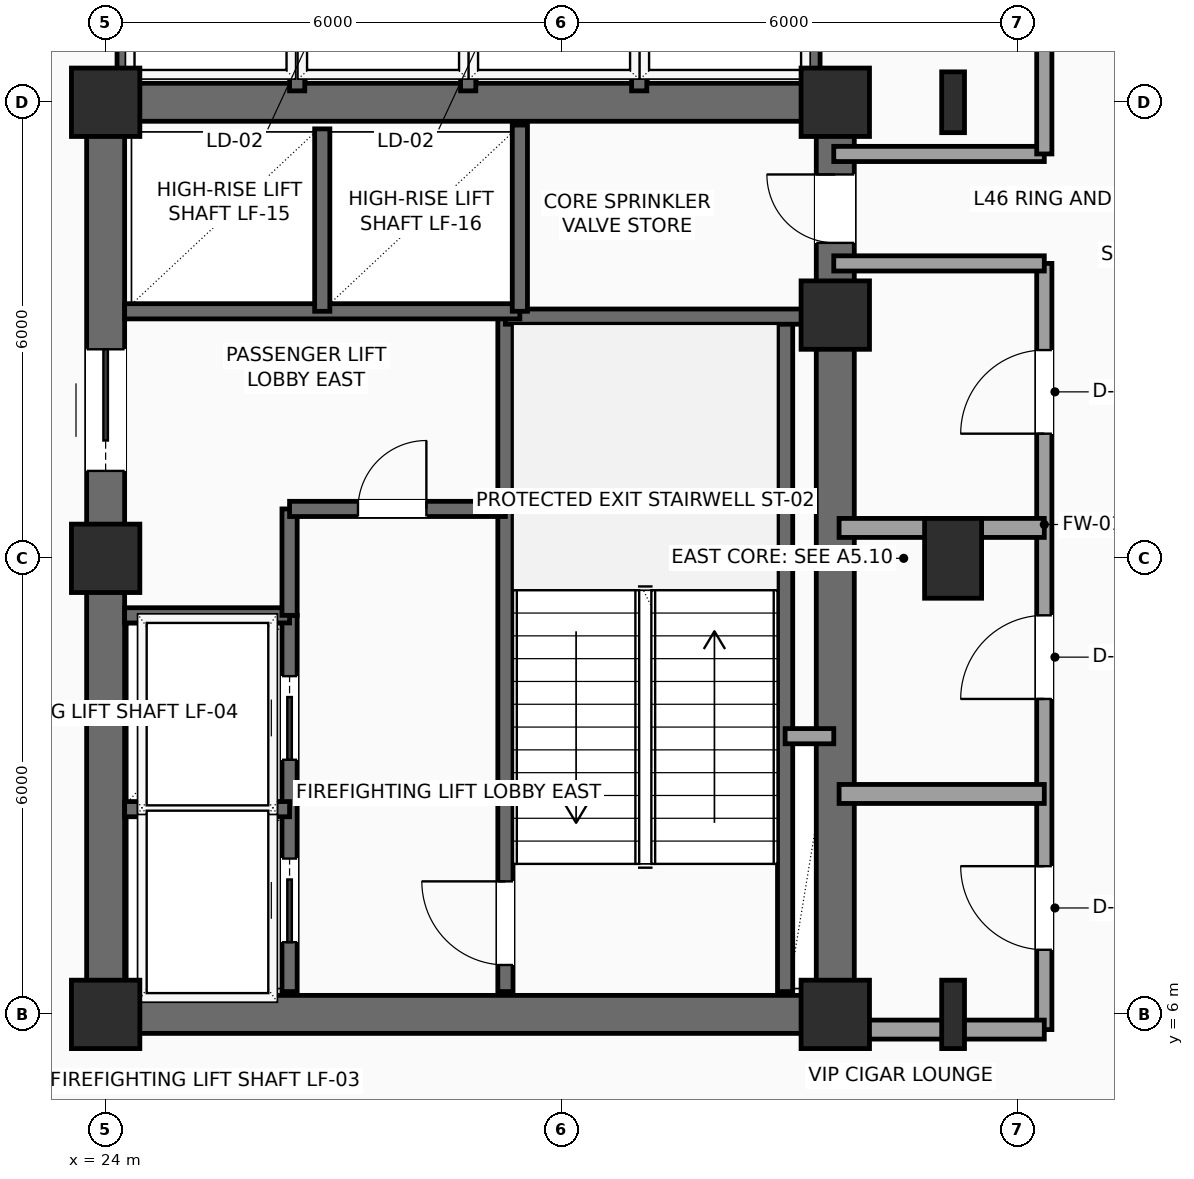
"""IFC4 building model, lengths in metres.
Left out: names, types, materials, properties, quantities, classifications, styles, units other than length and angle.
Written with IfcOpenShell. Run it as: python <this file> out.ifc"""

import sys

from ifc_helpers import new_model, si_unit, direction, frame, frame_2d, origin, origin_2d, place, context, subcontext, project, spatial, rectangle, i_section, extrude, element, fill, save


model = new_model("IFC4")
c1 = context("Model", 3, precision=1e-05, world=origin(), true_north=direction((0.0, 1.0)))
c2 = subcontext(c1, "Body", "Model", "MODEL_VIEW")
j1 = project(units=[si_unit("LENGTHUNIT", "METRE"), si_unit("PLANEANGLEUNIT", "RADIAN")], contexts=[c1])
p1 = place(None, origin())
s1 = spatial("IfcSite", under=j1, at=p1, CompositionType="ELEMENT")
p2 = place(p1, origin())
s2 = spatial("IfcBuilding", under=s1, at=p2, CompositionType="ELEMENT")
p3 = place(p2, frame((0.0, 0.0, 187.95)))
s3 = spatial("IfcBuildingStorey", under=s2, at=p3, CompositionType="ELEMENT", Elevation=187.95)
for number, where, z_axis, x_axis in (
    (1, (24.0, 6.0, 0.0), (0.0, 0.0, 1.0), (1.0, 0.0, 0.0)),
    (2, (24.0, 12.0, 0.0), (0.0, 0.0, 1.0), (1.0, 0.0, 0.0)),
    (3, (24.0, 18.0, 0.0), (0.0, 0.0, 1.0), (1.0, 0.0, 0.0)),
    (4, (33.6, 6.0, 0.0), (0.0, 0.0, 1.0), (1.0, 0.0, 0.0)),
    (5, (33.6, 15.2, 0.0), (0.0, 0.0, 1.0), (1.0, 0.0, 0.0)),
    (6, (33.6, 18.0, 0.0), (0.0, 0.0, 1.0), (1.0, 0.0, 0.0)),
):
    element("IfcColumn", number, at=place(p3, frame(where, z_axis=z_axis, x_axis=x_axis)), inside=s3, PredefinedType="COLUMN", context=c2, shape_type="SweptSolid", body=[
        extrude(rectangle(XDim=0.9, YDim=0.9, at=origin_2d()), origin(), (0.0, 0.0, 1.0), 3.75),
    ])
p4 = place(p3, frame((35.15, 6.0, 0.0), z_axis=(0.0, 0.0, 1.0), x_axis=(1.0, 0.0, 0.0)))
e7 = element("IfcColumn", 7, at=p4, inside=s3, PredefinedType="COLUMN", context=c2, shape_type="SweptSolid", body=[
    extrude(i_section(OverallWidth=0.3, OverallDepth=0.9, WebThickness=0.019, FlangeThickness=0.035, FilletRadius=0.03, at=origin_2d()), origin(), (0.0, 0.0, 1.0), 3.75),
])
p5 = place(p3, frame((35.15, 12.0, 0.0), z_axis=(0.0, 0.0, 1.0), x_axis=(1.0, 0.0, 0.0)))
e8 = element("IfcColumn", 8, at=p5, inside=s3, PredefinedType="COLUMN", context=c2, shape_type="SweptSolid", body=[
    extrude(rectangle(XDim=0.75, YDim=1.05, at=origin_2d()), origin(), (0.0, 0.0, 1.0), 3.75),
])
p6 = place(p3, frame((35.15, 18.0, 0.0), z_axis=(0.0, 0.0, 1.0), x_axis=(1.0, 0.0, 0.0)))
e9 = element("IfcColumn", 9, at=p6, inside=s3, PredefinedType="COLUMN", context=c2, shape_type="SweptSolid", body=[
    extrude(i_section(OverallWidth=0.3, OverallDepth=0.8, WebThickness=0.018, FlangeThickness=0.033, FilletRadius=0.03, at=origin_2d()), origin(), (0.0, 0.0, 1.0), 3.75),
])
for number, where, z_axis, x_axis in (
    (10, (24.0, 6.0, 0.0), (0.0, 0.0, 1.0), (1.0, 0.0, 0.0)),
    (11, (24.0, 18.0, 0.0), (0.0, 0.0, 1.0), (1.0, 0.0, 0.0)),
):
    element("IfcWall", number, at=place(p3, frame(where, z_axis=z_axis, x_axis=x_axis)), inside=s3, PredefinedType="SHEAR", context=c2, shape_type="SweptSolid", body=[
        extrude(rectangle(XDim=9.6, YDim=0.5, at=frame_2d((4.8, 0.0))), origin(), (0.0, 0.0, 1.0), 3.54),
    ])
p7 = place(p3, frame((24.0, 6.0, 0.0), z_axis=(0.0, 0.0, 1.0), x_axis=(0.0, 1.0, 0.0)))
e12 = element("IfcWall", 12, at=p7, inside=s3, PredefinedType="SHEAR", context=c2, shape_type="SweptSolid", body=[
    extrude(rectangle(XDim=12.0, YDim=0.5, at=frame_2d((6.0, 0.0))), origin(), (0.0, 0.0, 1.0), 3.54),
])
p8 = place(p7, frame((7.15, 0.0, 0.0)))
e13 = element("IfcOpeningElement", 13, at=p8, cuts=e12, PredefinedType="OPENING", context=c2, shape_type="SweptSolid", body=[
    extrude(rectangle(XDim=1.6, YDim=2.3, at=frame_2d((0.8, 1.15))), frame((0.0, 0.26, 0.0), z_axis=(0.0, -1.0, 0.0), x_axis=(1.0, 0.0, 0.0)), (0.0, 0.0, 1.0), 0.52),
])
p9 = place(p3, frame((33.6, 6.0, 0.0), z_axis=(0.0, 0.0, 1.0), x_axis=(0.0, 1.0, 0.0)))
e14 = element("IfcWall", 14, at=p9, inside=s3, PredefinedType="SHEAR", context=c2, shape_type="SweptSolid", body=[
    extrude(rectangle(XDim=12.0, YDim=0.5, at=frame_2d((6.0, 0.0))), origin(), (0.0, 0.0, 1.0), 3.54),
])
p10 = place(p9, frame((10.15, 0.0, 0.0)))
e15 = element("IfcOpeningElement", 15, at=p10, cuts=e14, PredefinedType="OPENING", context=c2, shape_type="SweptSolid", body=[
    extrude(rectangle(XDim=0.9, YDim=2.15, at=frame_2d((0.45, 1.075))), frame((0.0, 0.26, 0.0), z_axis=(0.0, -1.0, 0.0), x_axis=(1.0, 0.0, 0.0)), (0.0, 0.0, 1.0), 0.52),
])
p11 = place(p3, frame((29.26, 6.3, 0.0), z_axis=(0.0, 0.0, 1.0), x_axis=(0.0, 1.0, 0.0)))
e16 = element("IfcWall", 16, at=p11, inside=s3, PredefinedType="SHEAR", context=c2, shape_type="SweptSolid", body=[
    extrude(rectangle(XDim=8.88, YDim=0.2, at=frame_2d((4.44, 0.0))), origin(), (0.0, 0.0, 1.0), 3.54),
])
p12 = place(p11, frame((0.35, 0.0, 0.0)))
e17 = element("IfcOpeningElement", 17, at=p12, cuts=e16, PredefinedType="OPENING", context=c2, shape_type="SweptSolid", body=[
    extrude(rectangle(XDim=1.1, YDim=2.2, at=frame_2d((0.55, 1.1))), frame((0.0, 0.11, 0.0), z_axis=(0.0, -1.0, 0.0), x_axis=(1.0, 0.0, 0.0)), (0.0, 0.0, 1.0), 0.22),
])
p13 = place(p3, frame((32.94, 6.3, 0.0), z_axis=(0.0, 0.0, 1.0), x_axis=(0.0, 1.0, 0.0)))
e18 = element("IfcWall", 18, at=p13, inside=s3, PredefinedType="SHEAR", context=c2, shape_type="SweptSolid", body=[
    extrude(rectangle(XDim=8.88, YDim=0.2, at=frame_2d((4.44, 0.0))), origin(), (0.0, 0.0, 1.0), 3.54),
])
p14 = place(p3, frame((29.26, 15.18, 0.0), z_axis=(0.0, 0.0, 1.0), x_axis=(1.0, 0.0, 0.0)))
e19 = element("IfcWall", 19, at=p14, inside=s3, PredefinedType="SHEAR", context=c2, shape_type="SweptSolid", body=[
    extrude(rectangle(XDim=4.04, YDim=0.2, at=frame_2d((2.02, 0.0))), origin(), (0.0, 0.0, 1.0), 3.54),
])
p15 = place(p3, frame((26.42, 6.3, 0.0), z_axis=(0.0, 0.0, 1.0), x_axis=(0.0, 1.0, 0.0)))
e20 = element("IfcWall", 20, at=p15, inside=s3, PredefinedType="SHEAR", context=c2, shape_type="SweptSolid", body=[
    extrude(rectangle(XDim=4.95, YDim=0.2, at=frame_2d((2.475, 0.0))), origin(), (0.0, 0.0, 1.0), 3.54),
])
p16 = place(p15, frame((0.65, 0.0, 0.0)))
e21 = element("IfcOpeningElement", 21, at=p16, cuts=e20, PredefinedType="OPENING", context=c2, shape_type="SweptSolid", body=[
    extrude(rectangle(XDim=1.1, YDim=2.2, at=frame_2d((0.55, 1.1))), frame((0.0, 0.11, 0.0), z_axis=(0.0, -1.0, 0.0), x_axis=(1.0, 0.0, 0.0)), (0.0, 0.0, 1.0), 0.22),
])
p17 = place(p15, frame((3.05, 0.0, 0.0)))
e22 = element("IfcOpeningElement", 22, at=p17, cuts=e20, PredefinedType="OPENING", context=c2, shape_type="SweptSolid", body=[
    extrude(rectangle(XDim=1.1, YDim=2.2, at=frame_2d((0.55, 1.1))), frame((0.0, 0.11, 0.0), z_axis=(0.0, -1.0, 0.0), x_axis=(1.0, 0.0, 0.0)), (0.0, 0.0, 1.0), 0.22),
])
for number, where, z_axis, x_axis in (
    (23, (24.25, 8.7, 0.0), (0.0, 0.0, 1.0), (1.0, 0.0, 0.0)),
    (24, (24.25, 11.25, 0.0), (0.0, 0.0, 1.0), (1.0, 0.0, 0.0)),
):
    element("IfcWall", number, at=place(p3, frame(where, z_axis=z_axis, x_axis=x_axis)), inside=s3, PredefinedType="SHEAR", context=c2, shape_type="SweptSolid", body=[
        extrude(rectangle(XDim=2.17, YDim=0.2, at=frame_2d((1.085, 0.0))), origin(), (0.0, 0.0, 1.0), 3.54),
    ])
p18 = place(p3, frame((26.42, 11.25, 0.0), z_axis=(0.0, 0.0, 1.0), x_axis=(0.0, 1.0, 0.0)))
e25 = element("IfcWall", 25, at=p18, inside=s3, PredefinedType="SHEAR", context=c2, shape_type="SweptSolid", body=[
    extrude(rectangle(XDim=1.4, YDim=0.2, at=frame_2d((0.7, 0.0))), origin(), (0.0, 0.0, 1.0), 3.54),
])
p19 = place(p3, frame((26.42, 12.65, 0.0), z_axis=(0.0, 0.0, 1.0), x_axis=(1.0, 0.0, 0.0)))
e26 = element("IfcWall", 26, at=p19, inside=s3, PredefinedType="SHEAR", context=c2, shape_type="SweptSolid", body=[
    extrude(rectangle(XDim=2.84, YDim=0.2, at=frame_2d((1.42, 0.0))), origin(), (0.0, 0.0, 1.0), 3.54),
])
p20 = place(p19, frame((0.9, 0.0, 0.0)))
e27 = element("IfcOpeningElement", 27, at=p20, cuts=e26, PredefinedType="OPENING", context=c2, shape_type="SweptSolid", body=[
    extrude(rectangle(XDim=0.9, YDim=2.15, at=frame_2d((0.45, 1.075))), frame((0.0, 0.11, 0.0), z_axis=(0.0, -1.0, 0.0), x_axis=(1.0, 0.0, 0.0)), (0.0, 0.0, 1.0), 0.22),
])
p21 = place(p3, frame((32.94, 9.66, 0.0), z_axis=(0.0, 0.0, 1.0), x_axis=(1.0, 0.0, 0.0)))
e28 = element("IfcWall", 28, at=p21, inside=s3, PredefinedType="SOLIDWALL", context=c2, shape_type="SweptSolid", body=[
    extrude(rectangle(XDim=0.64, YDim=0.2, at=frame_2d((0.32, 0.0))), origin(), (0.0, 0.0, 1.0), 3.54),
])
p22 = place(p3, frame((24.25, 15.25, 0.0), z_axis=(0.0, 0.0, 1.0), x_axis=(1.0, 0.0, 0.0)))
e29 = element("IfcWall", 29, at=p22, inside=s3, PredefinedType="SHEAR", context=c2, shape_type="SweptSolid", body=[
    extrude(rectangle(XDim=5.2, YDim=0.2, at=frame_2d((2.6, 0.0))), origin(), (0.0, 0.0, 1.0), 3.54),
])
p23 = place(p3, frame((26.85, 15.25, 0.0), z_axis=(0.0, 0.0, 1.0), x_axis=(0.0, 1.0, 0.0)))
e30 = element("IfcWall", 30, at=p23, inside=s3, PredefinedType="SHEAR", context=c2, shape_type="SweptSolid", body=[
    extrude(rectangle(XDim=2.4, YDim=0.2, at=frame_2d((1.2, 0.0))), origin(), (0.0, 0.0, 1.0), 3.54),
])
p24 = place(p3, frame((29.45, 15.25, 0.0), z_axis=(0.0, 0.0, 1.0), x_axis=(0.0, 1.0, 0.0)))
e31 = element("IfcWall", 31, at=p24, inside=s3, PredefinedType="SHEAR", context=c2, shape_type="SweptSolid", body=[
    extrude(rectangle(XDim=2.45, YDim=0.2, at=frame_2d((1.225, 0.0))), origin(), (0.0, 0.0, 1.0), 3.54),
])
for number, where, z_axis, x_axis in (
    (32, (33.3, 18.1, 0.0), (0.0, 0.0, 1.0), (0.0, 1.0, 0.0)),
    (33, (24.25, 18.1, 0.0), (0.0, 0.0, 1.0), (0.0, 1.0, 0.0)),
):
    element("IfcWall", number, at=place(p3, frame(where, z_axis=z_axis, x_axis=x_axis)), inside=s3, PredefinedType="SHEAR", context=c2, shape_type="SweptSolid", body=[
        extrude(rectangle(XDim=2.35, YDim=0.2, at=frame_2d((1.175, 0.0))), origin(), (0.0, 0.0, 1.0), 3.54),
    ])
for number, where, z_axis, x_axis in (
    (34, (26.52, 18.15, 0.0), (0.0, 0.0, 1.0), (0.0, 1.0, 0.0)),
    (35, (28.77, 18.15, 0.0), (0.0, 0.0, 1.0), (0.0, 1.0, 0.0)),
    (36, (31.02, 18.15, 0.0), (0.0, 0.0, 1.0), (0.0, 1.0, 0.0)),
):
    element("IfcWall", number, at=place(p3, frame(where, z_axis=z_axis, x_axis=x_axis)), inside=s3, PredefinedType="SHEAR", context=c2, shape_type="SweptSolid", body=[
        extrude(rectangle(XDim=2.3, YDim=0.2, at=frame_2d((1.15, 0.0))), origin(), (0.0, 0.0, 1.0), 3.54),
    ])
p25 = place(p3, frame((36.35, 5.8, 0.0), z_axis=(0.0, 0.0, 1.0), x_axis=(0.0, 1.0, 0.0)))
e37 = element("IfcWall", 37, at=p25, inside=s3, PredefinedType="SOLIDWALL", context=c2, shape_type="SweptSolid", body=[
    extrude(rectangle(XDim=10.08, YDim=0.2, at=frame_2d((5.04, 0.0))), origin(), (0.0, 0.0, 1.0), 3.54),
])
p26 = place(p25, frame((1.05, 0.0, 0.0)))
e38 = element("IfcOpeningElement", 38, at=p26, cuts=e37, PredefinedType="OPENING", context=c2, shape_type="SweptSolid", body=[
    extrude(rectangle(XDim=1.1, YDim=2.25, at=frame_2d((0.55, 1.125))), frame((0.0, 0.11, 0.0), z_axis=(0.0, -1.0, 0.0), x_axis=(1.0, 0.0, 0.0)), (0.0, 0.0, 1.0), 0.22),
])
p27 = place(p25, frame((4.35, 0.0, 0.0)))
e39 = element("IfcOpeningElement", 39, at=p27, cuts=e37, PredefinedType="OPENING", context=c2, shape_type="SweptSolid", body=[
    extrude(rectangle(XDim=1.1, YDim=2.25, at=frame_2d((0.55, 1.125))), frame((0.0, 0.11, 0.0), z_axis=(0.0, -1.0, 0.0), x_axis=(1.0, 0.0, 0.0)), (0.0, 0.0, 1.0), 0.22),
])
p28 = place(p25, frame((7.84, 0.0, 0.0)))
e40 = element("IfcOpeningElement", 40, at=p28, cuts=e37, PredefinedType="OPENING", context=c2, shape_type="SweptSolid", body=[
    extrude(rectangle(XDim=1.1, YDim=2.25, at=frame_2d((0.55, 1.125))), frame((0.0, 0.11, 0.0), z_axis=(0.0, -1.0, 0.0), x_axis=(1.0, 0.0, 0.0)), (0.0, 0.0, 1.0), 0.22),
])
for number, where, z_axis, x_axis in (
    (41, (36.35, 15.88, 0.0), (0.0, 0.0, 1.0), (-1.0, 0.0, 0.0)),
    (42, (33.58, 17.32, 0.0), (0.0, 0.0, 1.0), (1.0, 0.0, 0.0)),
):
    element("IfcWall", number, at=place(p3, frame(where, z_axis=z_axis, x_axis=x_axis)), inside=s3, PredefinedType="SOLIDWALL", context=c2, shape_type="SweptSolid", body=[
        extrude(rectangle(XDim=2.77, YDim=0.2, at=frame_2d((1.385, 0.0))), origin(), (0.0, 0.0, 1.0), 3.54),
    ])
p29 = place(p3, frame((36.35, 17.32, 0.0), z_axis=(0.0, 0.0, 1.0), x_axis=(0.0, 1.0, 0.0)))
e43 = element("IfcWall", 43, at=p29, inside=s3, PredefinedType="SOLIDWALL", context=c2, shape_type="SweptSolid", body=[
    extrude(rectangle(XDim=5.53, YDim=0.2, at=frame_2d((2.765, 0.0))), origin(), (0.0, 0.0, 1.0), 3.54),
])
p30 = place(p29, frame((3.305, 0.0, 0.0)))
e44 = element("IfcOpeningElement", 44, at=p30, cuts=e43, PredefinedType="OPENING", context=c2, shape_type="SweptSolid", body=[
    extrude(rectangle(XDim=1.1, YDim=2.25, at=frame_2d((0.55, 1.125))), frame((0.0, 0.11, 0.0), z_axis=(0.0, -1.0, 0.0), x_axis=(1.0, 0.0, 0.0)), (0.0, 0.0, 1.0), 0.22),
])
for number, where, z_axis, x_axis in (
    (45, (33.65, 5.8, 0.0), (0.0, 0.0, 1.0), (1.0, 0.0, 0.0)),
    (46, (33.65, 8.9, 0.0), (0.0, 0.0, 1.0), (1.0, 0.0, 0.0)),
):
    element("IfcWall", number, at=place(p3, frame(where, z_axis=z_axis, x_axis=x_axis)), inside=s3, PredefinedType="PARTITIONING", context=c2, shape_type="SweptSolid", body=[
        extrude(rectangle(XDim=2.7, YDim=0.25, at=frame_2d((1.35, 0.0))), origin(), (0.0, 0.0, 1.0), 3.132),
    ])
p31 = place(p3, frame((33.65, 12.4, 0.0), z_axis=(0.0, 0.0, 1.0), x_axis=(1.0, 0.0, 0.0)))
e47 = element("IfcWall", 47, at=p31, inside=s3, PredefinedType="PARTITIONING", context=c2, shape_type="SweptSolid", body=[
    extrude(rectangle(XDim=2.7, YDim=0.25, at=frame_2d((1.35, 0.0))), origin(), (0.0, 0.0, 1.0), 3.54),
])
p32 = place(p8, origin())
e48 = element("IfcDoor", 48, at=p32, inside=s3, OperationType="DOUBLE_DOOR_SLIDING", PredefinedType="DOOR", context=c2, shape_type="SweptSolid", body=[
    extrude(rectangle(XDim=1.6, YDim=2.3, at=frame_2d((0.8, 1.15))), frame((0.0, 0.025, 0.0), z_axis=(0.0, -1.0, 0.0), x_axis=(1.0, 0.0, 0.0)), (0.0, 0.0, 1.0), 0.05),
])
fill(e13, e48)
p33 = place(p10, origin())
e49 = element("IfcDoor", 49, at=p33, inside=s3, OperationType="SINGLE_SWING_RIGHT", PredefinedType="DOOR", context=c2, shape_type="SweptSolid", body=[
    extrude(rectangle(XDim=0.9, YDim=2.15, at=frame_2d((0.45, 1.075))), frame((0.0, 0.025, 0.0), z_axis=(0.0, -1.0, 0.0), x_axis=(1.0, 0.0, 0.0)), (0.0, 0.0, 1.0), 0.05),
])
fill(e15, e49)
p34 = place(p12, origin())
e50 = element("IfcDoor", 50, at=p34, inside=s3, OperationType="SINGLE_SWING_RIGHT", PredefinedType="DOOR", context=c2, shape_type="SweptSolid", body=[
    extrude(rectangle(XDim=1.1, YDim=2.2, at=frame_2d((0.55, 1.1))), frame((0.0, 0.025, 0.0), z_axis=(0.0, -1.0, 0.0), x_axis=(1.0, 0.0, 0.0)), (0.0, 0.0, 1.0), 0.05),
])
fill(e17, e50)
p35 = place(p16, origin())
e51 = element("IfcDoor", 51, at=p35, inside=s3, OperationType="SLIDING_TO_LEFT", PredefinedType="DOOR", context=c2, shape_type="SweptSolid", body=[
    extrude(rectangle(XDim=1.1, YDim=2.2, at=frame_2d((0.55, 1.1))), frame((0.0, 0.025, 0.0), z_axis=(0.0, -1.0, 0.0), x_axis=(1.0, 0.0, 0.0)), (0.0, 0.0, 1.0), 0.05),
])
fill(e21, e51)
p36 = place(p17, origin())
e52 = element("IfcDoor", 52, at=p36, inside=s3, OperationType="SLIDING_TO_LEFT", PredefinedType="DOOR", context=c2, shape_type="SweptSolid", body=[
    extrude(rectangle(XDim=1.1, YDim=2.2, at=frame_2d((0.55, 1.1))), frame((0.0, 0.025, 0.0), z_axis=(0.0, -1.0, 0.0), x_axis=(1.0, 0.0, 0.0)), (0.0, 0.0, 1.0), 0.05),
])
fill(e22, e52)
p37 = place(p20, origin())
e53 = element("IfcDoor", 53, at=p37, inside=s3, OperationType="SINGLE_SWING_RIGHT", PredefinedType="DOOR", context=c2, shape_type="SweptSolid", body=[
    extrude(rectangle(XDim=0.9, YDim=2.15, at=frame_2d((0.45, 1.075))), frame((0.0, 0.025, 0.0), z_axis=(0.0, -1.0, 0.0), x_axis=(1.0, 0.0, 0.0)), (0.0, 0.0, 1.0), 0.05),
])
fill(e27, e53)
p38 = place(p26, origin())
e54 = element("IfcDoor", 54, at=p38, inside=s3, OperationType="SINGLE_SWING_RIGHT", PredefinedType="DOOR", context=c2, shape_type="SweptSolid", body=[
    extrude(rectangle(XDim=1.1, YDim=2.25, at=frame_2d((0.55, 1.125))), frame((0.0, 0.025, 0.0), z_axis=(0.0, -1.0, 0.0), x_axis=(1.0, 0.0, 0.0)), (0.0, 0.0, 1.0), 0.05),
])
fill(e38, e54)
p39 = place(p27, origin())
e55 = element("IfcDoor", 55, at=p39, inside=s3, OperationType="SINGLE_SWING_LEFT", PredefinedType="DOOR", context=c2, shape_type="SweptSolid", body=[
    extrude(rectangle(XDim=1.1, YDim=2.25, at=frame_2d((0.55, 1.125))), frame((0.0, 0.025, 0.0), z_axis=(0.0, -1.0, 0.0), x_axis=(1.0, 0.0, 0.0)), (0.0, 0.0, 1.0), 0.05),
])
fill(e39, e55)
p40 = place(p28, origin())
e56 = element("IfcDoor", 56, at=p40, inside=s3, OperationType="SINGLE_SWING_LEFT", PredefinedType="DOOR", context=c2, shape_type="SweptSolid", body=[
    extrude(rectangle(XDim=1.1, YDim=2.25, at=frame_2d((0.55, 1.125))), frame((0.0, 0.025, 0.0), z_axis=(0.0, -1.0, 0.0), x_axis=(1.0, 0.0, 0.0)), (0.0, 0.0, 1.0), 0.05),
])
fill(e40, e56)
save(model, sys.argv[1])
